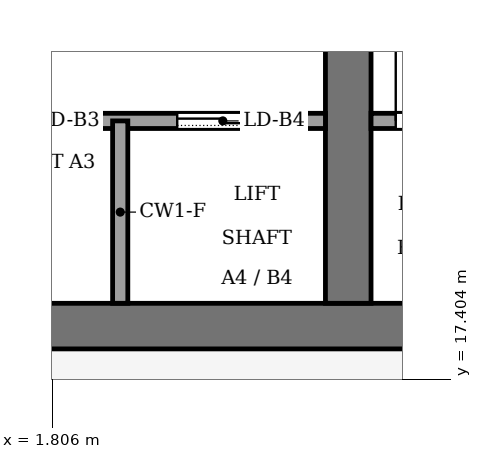
"""IFC4 building model, lengths in metres.
Left out: names, types, materials, properties, quantities, classifications, styles, units other than length and angle.
Written with IfcOpenShell. Run it as: python <this file> out.ifc"""

import sys

from ifc_helpers import new_model, si_unit, direction, frame, frame_2d, origin, place, context, subcontext, project, spatial, rectangle, extrude, element, fill, save


model = new_model("IFC4")
c1 = context("Model", 3, precision=1e-05, world=origin(), true_north=direction((0.0, 1.0)))
c2 = subcontext(c1, "Body", "Model", "MODEL_VIEW")
j1 = project(units=[si_unit("LENGTHUNIT", "METRE"), si_unit("PLANEANGLEUNIT", "RADIAN")], contexts=[c1])
p1 = place(None, origin())
s1 = spatial("IfcSite", under=j1, at=p1, CompositionType="ELEMENT")
p2 = place(p1, origin())
s2 = spatial("IfcBuilding", under=s1, at=p2, CompositionType="ELEMENT")
p3 = place(p2, frame((0.0, 0.0, 322.0)))
s3 = spatial("IfcBuildingStorey", under=s2, at=p3, CompositionType="ELEMENT", Elevation=322.0)
p4 = place(p3, frame((-13.2, 18.1, -0.13), z_axis=(0.0, 0.0, 1.0), x_axis=(1.0, 0.0, 0.0)))
e1 = element("IfcWall", 1, at=p4, inside=s3, PredefinedType="SHEAR", context=c2, shape_type="SweptSolid", body=[
    extrude(rectangle(XDim=26.4, YDim=0.6, at=frame_2d((13.2, 0.0))), origin(), (0.0, 0.0, 1.0), 4.0),
])
p5 = place(p3, frame((5.7, 18.4, -0.13), z_axis=(0.0, 0.0, 1.0), x_axis=(0.0, 1.0, 0.0)))
e2 = element("IfcWall", 2, at=p5, inside=s3, PredefinedType="SHEAR", context=c2, shape_type="SweptSolid", body=[
    extrude(rectangle(XDim=19.2, YDim=0.6, at=frame_2d((9.6, 0.0))), origin(), (0.0, 0.0, 1.0), 4.0),
])
p6 = place(p5, frame((13.3, 0.0, 0.13)))
e3 = element("IfcOpeningElement", 3, at=p6, cuts=e2, PredefinedType="OPENING", context=c2, shape_type="SweptSolid", body=[
    extrude(rectangle(XDim=2.4, YDim=2.4, at=frame_2d((1.2, 1.2))), frame((0.0, 0.31, 0.0), z_axis=(0.0, -1.0, 0.0), x_axis=(1.0, 0.0, 0.0)), (0.0, 0.0, 1.0), 0.62),
])
p7 = place(p3, frame((-5.4, 20.8, 0.0), z_axis=(0.0, 0.0, 1.0), x_axis=(1.0, 0.0, 0.0)))
e4 = element("IfcWall", 4, at=p7, inside=s3, PredefinedType="PARTITIONING", context=c2, shape_type="SweptSolid", body=[
    extrude(rectangle(XDim=10.8, YDim=0.2, at=frame_2d((5.4, 0.0))), origin(), (0.0, 0.0, 1.0), 3.87),
])
p8 = place(p7, frame((0.75, 0.0, 0.0)))
e5 = element("IfcOpeningElement", 5, at=p8, cuts=e4, PredefinedType="OPENING", context=c2, shape_type="SweptSolid", body=[
    extrude(rectangle(XDim=1.2, YDim=2.2, at=frame_2d((0.6, 1.1))), frame((0.0, 0.11, 0.0), z_axis=(0.0, -1.0, 0.0), x_axis=(1.0, 0.0, 0.0)), (0.0, 0.0, 1.0), 0.22),
])
p9 = place(p7, frame((3.45, 0.0, 0.0)))
e6 = element("IfcOpeningElement", 6, at=p9, cuts=e4, PredefinedType="OPENING", context=c2, shape_type="SweptSolid", body=[
    extrude(rectangle(XDim=1.2, YDim=2.2, at=frame_2d((0.6, 1.1))), frame((0.0, 0.11, 0.0), z_axis=(0.0, -1.0, 0.0), x_axis=(1.0, 0.0, 0.0)), (0.0, 0.0, 1.0), 0.22),
])
p10 = place(p7, frame((6.15, 0.0, 0.0)))
e7 = element("IfcOpeningElement", 7, at=p10, cuts=e4, PredefinedType="OPENING", context=c2, shape_type="SweptSolid", body=[
    extrude(rectangle(XDim=1.2, YDim=2.2, at=frame_2d((0.6, 1.1))), frame((0.0, 0.11, 0.0), z_axis=(0.0, -1.0, 0.0), x_axis=(1.0, 0.0, 0.0)), (0.0, 0.0, 1.0), 0.22),
])
p11 = place(p7, frame((8.85, 0.0, 0.0)))
e8 = element("IfcOpeningElement", 8, at=p11, cuts=e4, PredefinedType="OPENING", context=c2, shape_type="SweptSolid", body=[
    extrude(rectangle(XDim=1.2, YDim=2.2, at=frame_2d((0.6, 1.1))), frame((0.0, 0.11, 0.0), z_axis=(0.0, -1.0, 0.0), x_axis=(1.0, 0.0, 0.0)), (0.0, 0.0, 1.0), 0.22),
])
p12 = place(p3, frame((6.0, 20.8, 0.0), z_axis=(0.0, 0.0, 1.0), x_axis=(1.0, 0.0, 0.0)))
e9 = element("IfcWall", 9, at=p12, inside=s3, PredefinedType="PARTITIONING", context=c2, shape_type="SweptSolid", body=[
    extrude(rectangle(XDim=6.6, YDim=0.2, at=frame_2d((3.3, 0.0))), origin(), (0.0, 0.0, 1.0), 3.87),
])
p13 = place(p12, frame((0.325, 0.0, 0.0)))
e10 = element("IfcOpeningElement", 10, at=p13, cuts=e9, PredefinedType="OPENING", context=c2, shape_type="SweptSolid", body=[
    extrude(rectangle(XDim=1.0, YDim=2.1, at=frame_2d((0.5, 1.05))), frame((0.0, 0.11, 0.0), z_axis=(0.0, -1.0, 0.0), x_axis=(1.0, 0.0, 0.0)), (0.0, 0.0, 1.0), 0.22),
])
p14 = place(p12, frame((2.8, 0.0, 0.0)))
e11 = element("IfcOpeningElement", 11, at=p14, cuts=e9, PredefinedType="OPENING", context=c2, shape_type="SweptSolid", body=[
    extrude(rectangle(XDim=1.0, YDim=2.1, at=frame_2d((0.5, 1.05))), frame((0.0, 0.11, 0.0), z_axis=(0.0, -1.0, 0.0), x_axis=(1.0, 0.0, 0.0)), (0.0, 0.0, 1.0), 0.22),
])
p15 = place(p12, frame((5.275, 0.0, 0.0)))
e12 = element("IfcOpeningElement", 12, at=p15, cuts=e9, PredefinedType="OPENING", context=c2, shape_type="SweptSolid", body=[
    extrude(rectangle(XDim=1.0, YDim=2.1, at=frame_2d((0.5, 1.05))), frame((0.0, 0.11, 0.0), z_axis=(0.0, -1.0, 0.0), x_axis=(1.0, 0.0, 0.0)), (0.0, 0.0, 1.0), 0.22),
])
p16 = place(p3, frame((2.7, 18.4, 0.0), z_axis=(0.0, 0.0, 1.0), x_axis=(0.0, 1.0, 0.0)))
e13 = element("IfcWall", 13, at=p16, inside=s3, PredefinedType="PARTITIONING", context=c2, shape_type="SweptSolid", body=[
    extrude(rectangle(XDim=2.4, YDim=0.2, at=frame_2d((1.2, 0.0))), origin(), (0.0, 0.0, 1.0), 3.87),
])
p17 = place(p10, origin())
e14 = element("IfcDoor", 14, at=p17, inside=s3, OperationType="SLIDING_TO_LEFT", PredefinedType="DOOR", context=c2, shape_type="SweptSolid", body=[
    extrude(rectangle(XDim=1.2, YDim=2.2, at=frame_2d((0.6, 1.1))), frame((0.0, 0.025, 0.0), z_axis=(0.0, -1.0, 0.0), x_axis=(1.0, 0.0, 0.0)), (0.0, 0.0, 1.0), 0.05),
])
fill(e7, e14)
p18 = place(p11, origin())
e15 = element("IfcDoor", 15, at=p18, inside=s3, OperationType="SLIDING_TO_LEFT", PredefinedType="DOOR", context=c2, shape_type="SweptSolid", body=[
    extrude(rectangle(XDim=1.2, YDim=2.2, at=frame_2d((0.6, 1.1))), frame((0.0, 0.025, 0.0), z_axis=(0.0, -1.0, 0.0), x_axis=(1.0, 0.0, 0.0)), (0.0, 0.0, 1.0), 0.05),
])
fill(e8, e15)
p19 = place(p13, origin())
e16 = element("IfcDoor", 16, at=p19, inside=s3, OperationType="SINGLE_SWING_LEFT", PredefinedType="DOOR", context=c2, shape_type="SweptSolid", body=[
    extrude(rectangle(XDim=1.0, YDim=2.1, at=frame_2d((0.5, 1.05))), frame((0.0, 0.025, 0.0), z_axis=(0.0, -1.0, 0.0), x_axis=(1.0, 0.0, 0.0)), (0.0, 0.0, 1.0), 0.05),
])
fill(e10, e16)
save(model, sys.argv[1])
